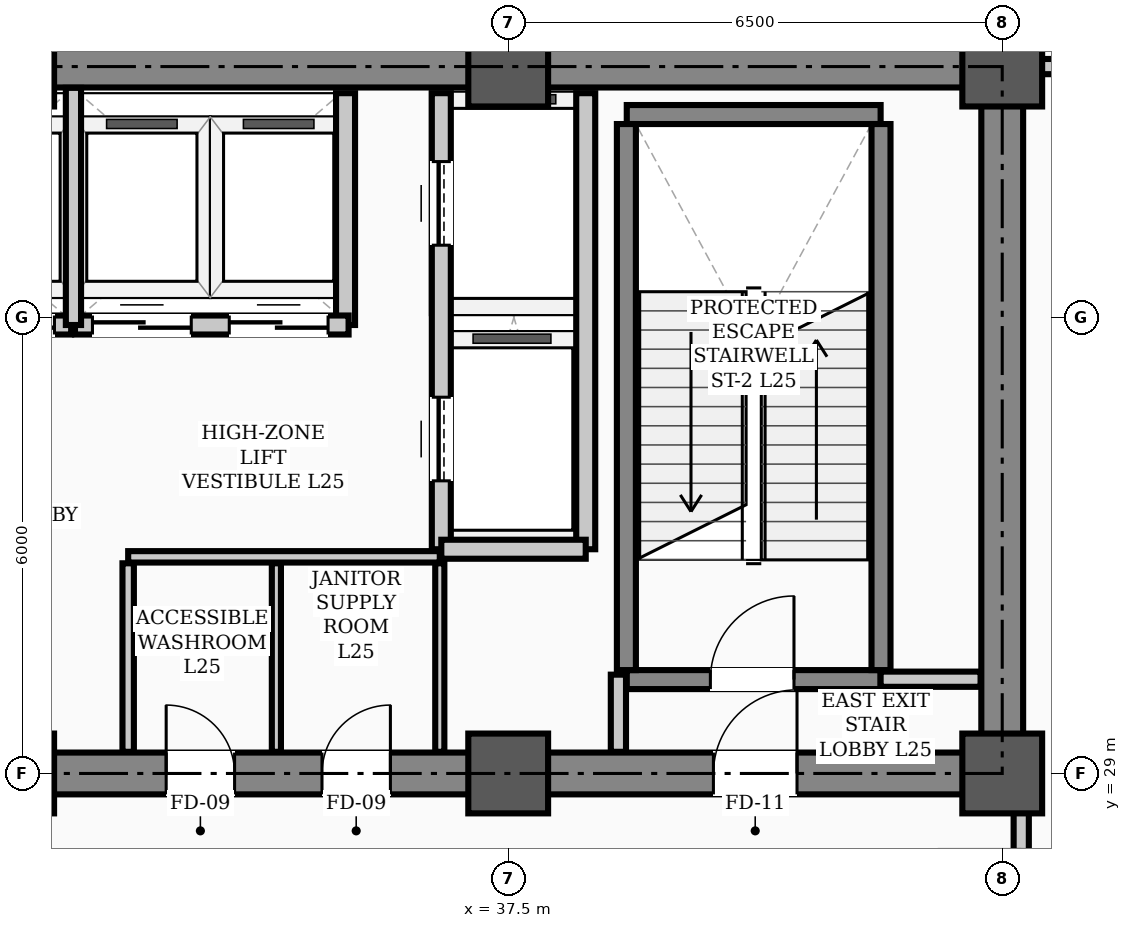
"""IFC4 building model, lengths in metres.
Left out: names, types, materials, properties, quantities, classifications, styles, units other than length and angle.
Written with IfcOpenShell. Run it as: python <this file> out.ifc"""

import sys

from ifc_helpers import new_model, si_unit, direction, frame, frame_2d, origin, origin_2d, place, context, subcontext, project, spatial, rectangle, hollow_rectangle, extrude, element, fill, save


model = new_model("IFC4")
c1 = context("Model", 3, precision=1e-05, world=origin(), true_north=direction((0.0, 1.0)))
c2 = subcontext(c1, "Body", "Model", "MODEL_VIEW")
j1 = project(units=[si_unit("LENGTHUNIT", "METRE"), si_unit("PLANEANGLEUNIT", "RADIAN")], contexts=[c1])
p1 = place(None, origin())
s1 = spatial("IfcSite", under=j1, at=p1, CompositionType="ELEMENT")
p2 = place(p1, origin())
s2 = spatial("IfcBuilding", under=s1, at=p2, CompositionType="ELEMENT")
p3 = place(p2, frame((0.0, 0.0, 100.6)))
s3 = spatial("IfcBuildingStorey", under=s2, at=p3, CompositionType="ELEMENT", Elevation=100.6)
for number, where, z_axis, x_axis in (
    (1, (31.0, 29.0, 0.0), (0.0, 0.0, 1.0), (1.0, 0.0, 0.0)),
    (2, (31.0, 38.3, 0.0), (0.0, 0.0, 1.0), (1.0, 0.0, 0.0)),
    (3, (37.5, 29.0, 0.0), (0.0, 0.0, 1.0), (1.0, 0.0, 0.0)),
    (4, (37.5, 38.3, 0.0), (0.0, 0.0, 1.0), (1.0, 0.0, 0.0)),
    (5, (44.0, 29.0, 0.0), (0.0, 0.0, 1.0), (1.0, 0.0, 0.0)),
    (6, (44.0, 38.3, 0.0), (0.0, 0.0, 1.0), (1.0, 0.0, 0.0)),
):
    element("IfcColumn", number, at=place(p3, frame(where, z_axis=z_axis, x_axis=x_axis)), inside=s3, PredefinedType="COLUMN", context=c2, shape_type="SweptSolid", body=[
        extrude(hollow_rectangle(XDim=1.05, YDim=1.05, WallThickness=0.038, InnerFilletRadius=0.019, OuterFilletRadius=0.057, at=origin_2d()), origin(), (0.0, 0.0, 1.0), 5.4),
    ])
p4 = place(p3, frame((13.5, 29.0, 0.0), z_axis=(0.0, 0.0, 1.0), x_axis=(1.0, 0.0, 0.0)))
e7 = element("IfcWall", 7, at=p4, inside=s3, PredefinedType="SHEAR", context=c2, shape_type="SweptSolid", body=[
    extrude(rectangle(XDim=30.5, YDim=0.55, at=frame_2d((15.25, 0.0))), origin(), (0.0, 0.0, 1.0), 5.22),
])
p5 = place(p4, frame((1.75, 0.0, 0.0)))
e8 = element("IfcOpeningElement", 8, at=p5, cuts=e7, PredefinedType="OPENING", context=c2, shape_type="SweptSolid", body=[
    extrude(rectangle(XDim=1.1, YDim=2.08, at=frame_2d((0.55, 1.04))), frame((0.0, 0.285, 0.0), z_axis=(0.0, -1.0, 0.0), x_axis=(1.0, 0.0, 0.0)), (0.0, 0.0, 1.0), 0.57),
])
p6 = place(p4, frame((26.7, 0.0, 0.0)))
e9 = element("IfcOpeningElement", 9, at=p6, cuts=e7, PredefinedType="OPENING", context=c2, shape_type="SweptSolid", body=[
    extrude(rectangle(XDim=1.1, YDim=2.08, at=frame_2d((0.55, 1.04))), frame((0.0, 0.285, 0.0), z_axis=(0.0, -1.0, 0.0), x_axis=(1.0, 0.0, 0.0)), (0.0, 0.0, 1.0), 0.57),
])
p7 = place(p4, frame((6.8, 0.0, 0.0)))
e10 = element("IfcOpeningElement", 10, at=p7, cuts=e7, PredefinedType="OPENING", context=c2, shape_type="SweptSolid", body=[
    extrude(rectangle(XDim=1.1, YDim=2.08, at=frame_2d((0.55, 1.04))), frame((0.0, 0.285, 0.0), z_axis=(0.0, -1.0, 0.0), x_axis=(1.0, 0.0, 0.0)), (0.0, 0.0, 1.0), 0.57),
])
p8 = place(p4, frame((13.2, 0.0, 0.0)))
e11 = element("IfcOpeningElement", 11, at=p8, cuts=e7, PredefinedType="OPENING", context=c2, shape_type="SweptSolid", body=[
    extrude(rectangle(XDim=1.6, YDim=2.08, at=frame_2d((0.8, 1.04))), frame((0.0, 0.285, 0.0), z_axis=(0.0, -1.0, 0.0), x_axis=(1.0, 0.0, 0.0)), (0.0, 0.0, 1.0), 0.57),
])
p9 = place(p4, frame((19.5, 0.0, 0.0)))
e12 = element("IfcOpeningElement", 12, at=p9, cuts=e7, PredefinedType="OPENING", context=c2, shape_type="SweptSolid", body=[
    extrude(rectangle(XDim=0.9, YDim=2.08, at=frame_2d((0.45, 1.04))), frame((0.0, 0.285, 0.0), z_axis=(0.0, -1.0, 0.0), x_axis=(1.0, 0.0, 0.0)), (0.0, 0.0, 1.0), 0.57),
])
p10 = place(p4, frame((21.55, 0.0, 0.0)))
e13 = element("IfcOpeningElement", 13, at=p10, cuts=e7, PredefinedType="OPENING", context=c2, shape_type="SweptSolid", body=[
    extrude(rectangle(XDim=0.9, YDim=2.08, at=frame_2d((0.45, 1.04))), frame((0.0, 0.285, 0.0), z_axis=(0.0, -1.0, 0.0), x_axis=(1.0, 0.0, 0.0)), (0.0, 0.0, 1.0), 0.57),
])
p11 = place(p3, frame((13.5, 38.3, 0.0), z_axis=(0.0, 0.0, 1.0), x_axis=(1.0, 0.0, 0.0)))
e14 = element("IfcWall", 14, at=p11, inside=s3, PredefinedType="SHEAR", context=c2, shape_type="SweptSolid", body=[
    extrude(rectangle(XDim=30.5, YDim=0.55, at=frame_2d((15.25, 0.0))), origin(), (0.0, 0.0, 1.0), 5.22),
])
p12 = place(p3, frame((44.0, 29.35, 0.0), z_axis=(0.0, 0.0, 1.0), x_axis=(0.0, 1.0, 0.0)))
e15 = element("IfcWall", 15, at=p12, inside=s3, PredefinedType="SHEAR", context=c2, shape_type="SweptSolid", body=[
    extrude(rectangle(XDim=8.6, YDim=0.55, at=frame_2d((4.3, 0.0))), origin(), (0.0, 0.0, 1.0), 5.22),
])
p13 = place(p3, frame((39.06, 30.235, 0.0), z_axis=(0.0, 0.0, 1.0), x_axis=(1.0, 0.0, 0.0)))
e16 = element("IfcWall", 16, at=p13, inside=s3, PredefinedType="STANDARD", context=c2, shape_type="SweptSolid", body=[
    extrude(rectangle(XDim=3.34, YDim=0.25, at=frame_2d((1.67, 0.0))), origin(), (0.0, 0.0, 1.0), 5.22),
])
p14 = place(p13, frame((1.1, 0.0, 0.0)))
e17 = element("IfcOpeningElement", 17, at=p14, cuts=e16, PredefinedType="OPENING", context=c2, shape_type="SweptSolid", body=[
    extrude(rectangle(XDim=1.1, YDim=2.08, at=frame_2d((0.55, 1.04))), frame((0.0, 0.135, 0.0), z_axis=(0.0, -1.0, 0.0), x_axis=(1.0, 0.0, 0.0)), (0.0, 0.0, 1.0), 0.27),
])
p15 = place(p3, frame((39.06, 37.669, 0.0), z_axis=(0.0, 0.0, 1.0), x_axis=(1.0, 0.0, 0.0)))
e18 = element("IfcWall", 18, at=p15, inside=s3, PredefinedType="STANDARD", context=c2, shape_type="SweptSolid", body=[
    extrude(rectangle(XDim=3.34, YDim=0.25, at=frame_2d((1.67, 0.0))), origin(), (0.0, 0.0, 1.0), 5.22),
])
for number, where, z_axis, x_axis in (
    (19, (39.055, 30.36, 0.0), (0.0, 0.0, 1.0), (0.0, 1.0, 0.0)),
    (20, (42.405, 30.36, 0.0), (0.0, 0.0, 1.0), (0.0, 1.0, 0.0)),
):
    element("IfcWall", number, at=place(p3, frame(where, z_axis=z_axis, x_axis=x_axis)), inside=s3, PredefinedType="STANDARD", context=c2, shape_type="SweptSolid", body=[
        extrude(rectangle(XDim=7.184, YDim=0.25, at=frame_2d((3.592, 0.0))), origin(), (0.0, 0.0, 1.0), 5.22),
    ])
p16 = place(p3, frame((36.62, 31.95, 0.0), z_axis=(0.0, 0.0, 1.0), x_axis=(0.0, 1.0, 0.0)))
e21 = element("IfcWall", 21, at=p16, inside=s3, PredefinedType="STANDARD", context=c2, shape_type="SweptSolid", body=[
    extrude(rectangle(XDim=6.0, YDim=0.25, at=frame_2d((3.0, 0.0))), origin(), (0.0, 0.0, 1.0), 4.8),
])
p17 = place(p16, frame((0.9, 0.0, 0.0)))
e22 = element("IfcOpeningElement", 22, at=p17, cuts=e21, PredefinedType="OPENING", context=c2, shape_type="SweptSolid", body=[
    extrude(rectangle(XDim=1.1, YDim=2.08, at=frame_2d((0.55, 1.04))), frame((0.0, 0.135, 0.0), z_axis=(0.0, -1.0, 0.0), x_axis=(1.0, 0.0, 0.0)), (0.0, 0.0, 1.0), 0.27),
])
p18 = place(p16, frame((4.0, 0.0, 0.0)))
e23 = element("IfcOpeningElement", 23, at=p18, cuts=e21, PredefinedType="OPENING", context=c2, shape_type="SweptSolid", body=[
    extrude(rectangle(XDim=1.1, YDim=2.08, at=frame_2d((0.55, 1.04))), frame((0.0, 0.135, 0.0), z_axis=(0.0, -1.0, 0.0), x_axis=(1.0, 0.0, 0.0)), (0.0, 0.0, 1.0), 0.27),
])
p19 = place(p3, frame((38.52, 31.95, 0.0), z_axis=(0.0, 0.0, 1.0), x_axis=(0.0, 1.0, 0.0)))
e24 = element("IfcWall", 24, at=p19, inside=s3, PredefinedType="STANDARD", context=c2, shape_type="SweptSolid", body=[
    extrude(rectangle(XDim=6.0, YDim=0.25, at=frame_2d((3.0, 0.0))), origin(), (0.0, 0.0, 1.0), 4.8),
])
p20 = place(p3, frame((36.62, 31.95, 0.0), z_axis=(0.0, 0.0, 1.0), x_axis=(1.0, 0.0, 0.0)))
e25 = element("IfcWall", 25, at=p20, inside=s3, PredefinedType="STANDARD", context=c2, shape_type="SweptSolid", body=[
    extrude(rectangle(XDim=1.9, YDim=0.25, at=frame_2d((0.95, 0.0))), origin(), (0.0, 0.0, 1.0), 4.98),
])
p21 = place(p3, frame((35.36, 34.9, 0.0), z_axis=(0.0, 0.0, 1.0), x_axis=(0.0, 1.0, 0.0)))
e26 = element("IfcWall", 26, at=p21, inside=s3, PredefinedType="STANDARD", context=c2, shape_type="SweptSolid", body=[
    extrude(rectangle(XDim=3.05, YDim=0.25, at=frame_2d((1.525, 0.0))), origin(), (0.0, 0.0, 1.0), 4.8),
])
p22 = place(p3, frame((28.2, 34.9, 0.0), z_axis=(0.0, 0.0, 1.0), x_axis=(1.0, 0.0, 0.0)))
e27 = element("IfcWall", 27, at=p22, inside=s3, PredefinedType="STANDARD", context=c2, shape_type="SweptSolid", body=[
    extrude(rectangle(XDim=3.55, YDim=0.25, at=frame_2d((1.775, 0.0))), origin(), (0.0, 0.0, 1.0), 5.22),
])
p23 = place(p22, frame((0.23, 0.0, 0.0)))
e28 = element("IfcOpeningElement", 28, at=p23, cuts=e27, PredefinedType="OPENING", context=c2, shape_type="SweptSolid", body=[
    extrude(rectangle(XDim=1.3, YDim=2.08, at=frame_2d((0.65, 1.04))), frame((0.0, 0.135, 0.0), z_axis=(0.0, -1.0, 0.0), x_axis=(1.0, 0.0, 0.0)), (0.0, 0.0, 1.0), 0.27),
])
p24 = place(p22, frame((2.03, 0.0, 0.0)))
e29 = element("IfcOpeningElement", 29, at=p24, cuts=e27, PredefinedType="OPENING", context=c2, shape_type="SweptSolid", body=[
    extrude(rectangle(XDim=1.3, YDim=2.08, at=frame_2d((0.65, 1.04))), frame((0.0, 0.135, 0.0), z_axis=(0.0, -1.0, 0.0), x_axis=(1.0, 0.0, 0.0)), (0.0, 0.0, 1.0), 0.27),
])
p25 = place(p3, frame((31.8, 34.9, 0.0), z_axis=(0.0, 0.0, 1.0), x_axis=(1.0, 0.0, 0.0)))
e30 = element("IfcWall", 30, at=p25, inside=s3, PredefinedType="STANDARD", context=c2, shape_type="SweptSolid", body=[
    extrude(rectangle(XDim=3.6, YDim=0.25, at=frame_2d((1.8, 0.0))), origin(), (0.0, 0.0, 1.0), 5.22),
])
p26 = place(p25, frame((0.23, 0.0, 0.0)))
e31 = element("IfcOpeningElement", 31, at=p26, cuts=e30, PredefinedType="OPENING", context=c2, shape_type="SweptSolid", body=[
    extrude(rectangle(XDim=1.3, YDim=2.08, at=frame_2d((0.65, 1.04))), frame((0.0, 0.135, 0.0), z_axis=(0.0, -1.0, 0.0), x_axis=(1.0, 0.0, 0.0)), (0.0, 0.0, 1.0), 0.27),
])
p27 = place(p25, frame((2.03, 0.0, 0.0)))
e32 = element("IfcOpeningElement", 32, at=p27, cuts=e30, PredefinedType="OPENING", context=c2, shape_type="SweptSolid", body=[
    extrude(rectangle(XDim=1.3, YDim=2.08, at=frame_2d((0.65, 1.04))), frame((0.0, 0.135, 0.0), z_axis=(0.0, -1.0, 0.0), x_axis=(1.0, 0.0, 0.0)), (0.0, 0.0, 1.0), 0.27),
])
p28 = place(p3, frame((42.4, 30.24, 0.0), z_axis=(0.0, 0.0, 1.0), x_axis=(1.0, 0.0, 0.0)))
e33 = element("IfcWall", 33, at=p28, inside=s3, PredefinedType="STANDARD", context=c2, shape_type="SweptSolid", body=[
    extrude(rectangle(XDim=1.315, YDim=0.2, at=frame_2d((0.658, 0.0))), origin(), (0.0, 0.0, 1.0), 4.6),
])
p29 = place(p3, frame((32.5, 31.85, 0.0), z_axis=(0.0, 0.0, 1.0), x_axis=(1.0, 0.0, 0.0)))
e34 = element("IfcWall", 34, at=p29, inside=s3, PredefinedType="PARTITIONING", context=c2, shape_type="SweptSolid", body=[
    extrude(rectangle(XDim=4.1, YDim=0.15, at=frame_2d((2.05, 0.0))), origin(), (0.0, 0.0, 1.0), 5.22),
])
p30 = place(p3, frame((44.0, 38.3, 0.0), z_axis=(0.0, 0.0, 1.0), x_axis=(1.0, 0.0, 0.0)))
e35 = element("IfcWall", 35, at=p30, inside=s3, PredefinedType="STANDARD", context=c2, shape_type="SweptSolid", body=[
    extrude(rectangle(XDim=13.19, YDim=0.2, at=frame_2d((6.595, 0.0))), origin(), (0.0, 0.0, 1.0), 4.5),
])
p31 = place(p3, frame((38.95, 29.285, 0.0), z_axis=(0.0, 0.0, 1.0), x_axis=(0.0, 1.0, 0.0)))
e36 = element("IfcWall", 36, at=p31, inside=s3, PredefinedType="STANDARD", context=c2, shape_type="SweptSolid", body=[
    extrude(rectangle(XDim=1.015, YDim=0.2, at=frame_2d((0.508, 0.0))), origin(), (0.0, 0.0, 1.0), 4.8),
])
p32 = place(p3, frame((32.5, 29.285, 0.0), z_axis=(0.0, 0.0, 1.0), x_axis=(0.0, 1.0, 0.0)))
e37 = element("IfcWall", 37, at=p32, inside=s3, PredefinedType="PARTITIONING", context=c2, shape_type="SweptSolid", body=[
    extrude(rectangle(XDim=2.48, YDim=0.15, at=frame_2d((1.24, 0.0))), origin(), (0.0, 0.0, 1.0), 4.8),
])
for number, where, z_axis, x_axis in (
    (38, (36.6, 29.285, 0.0), (0.0, 0.0, 1.0), (0.0, 1.0, 0.0)),
    (39, (34.45, 29.285, 0.0), (0.0, 0.0, 1.0), (0.0, 1.0, 0.0)),
):
    element("IfcWall", number, at=place(p3, frame(where, z_axis=z_axis, x_axis=x_axis)), inside=s3, PredefinedType="PARTITIONING", context=c2, shape_type="SweptSolid", body=[
        extrude(rectangle(XDim=2.48, YDim=0.12, at=frame_2d((1.24, 0.0))), origin(), (0.0, 0.0, 1.0), 4.8),
    ])
p33 = place(p3, frame((44.25, 26.11, 0.0), z_axis=(0.0, 0.0, 1.0), x_axis=(0.0, 1.0, 0.0)))
e40 = element("IfcWall", 40, at=p33, inside=s3, PredefinedType="STANDARD", context=c2, shape_type="SweptSolid", body=[
    extrude(rectangle(XDim=3.24, YDim=0.2, at=frame_2d((1.62, 0.0))), origin(), (0.0, 0.0, 1.0), 4.5),
])
p34 = place(p33, frame((0.79, 0.0, 0.0)))
e41 = element("IfcOpeningElement", 41, at=p34, cuts=e40, PredefinedType="OPENING", context=c2, shape_type="SweptSolid", body=[
    extrude(rectangle(XDim=1.1, YDim=2.08, at=frame_2d((0.55, 1.04))), frame((0.0, 0.11, 0.0), z_axis=(0.0, -1.0, 0.0), x_axis=(1.0, 0.0, 0.0)), (0.0, 0.0, 1.0), 0.22),
])
p35 = place(p3, frame((31.78, 34.9, 0.0), z_axis=(0.0, 0.0, 1.0), x_axis=(0.0, 1.0, 0.0)))
e42 = element("IfcWall", 42, at=p35, inside=s3, PredefinedType="STANDARD", context=c2, shape_type="SweptSolid", body=[
    extrude(rectangle(XDim=3.12, YDim=0.2, at=frame_2d((1.56, 0.0))), origin(), (0.0, 0.0, 1.0), 4.8),
])
p36 = place(p14, origin())
e43 = element("IfcDoor", 43, at=p36, inside=s3, OperationType="SINGLE_SWING_RIGHT", PredefinedType="DOOR", context=c2, shape_type="SweptSolid", body=[
    extrude(rectangle(XDim=1.1, YDim=2.08, at=frame_2d((0.55, 1.04))), frame((0.0, 0.025, 0.0), z_axis=(0.0, -1.0, 0.0), x_axis=(1.0, 0.0, 0.0)), (0.0, 0.0, 1.0), 0.05),
])
fill(e17, e43)
p37 = place(p6, origin())
e44 = element("IfcDoor", 44, at=p37, inside=s3, OperationType="SINGLE_SWING_RIGHT", PredefinedType="DOOR", context=c2, shape_type="SweptSolid", body=[
    extrude(rectangle(XDim=1.1, YDim=2.08, at=frame_2d((0.55, 1.04))), frame((0.0, 0.025, 0.0), z_axis=(0.0, -1.0, 0.0), x_axis=(1.0, 0.0, 0.0)), (0.0, 0.0, 1.0), 0.05),
])
fill(e9, e44)
p38 = place(p9, origin())
e45 = element("IfcDoor", 45, at=p38, inside=s3, OperationType="SINGLE_SWING_LEFT", PredefinedType="DOOR", context=c2, shape_type="SweptSolid", body=[
    extrude(rectangle(XDim=0.9, YDim=2.08, at=frame_2d((0.45, 1.04))), frame((0.0, 0.025, 0.0), z_axis=(0.0, -1.0, 0.0), x_axis=(1.0, 0.0, 0.0)), (0.0, 0.0, 1.0), 0.05),
])
fill(e12, e45)
p39 = place(p10, origin())
e46 = element("IfcDoor", 46, at=p39, inside=s3, OperationType="SINGLE_SWING_RIGHT", PredefinedType="DOOR", context=c2, shape_type="SweptSolid", body=[
    extrude(rectangle(XDim=0.9, YDim=2.08, at=frame_2d((0.45, 1.04))), frame((0.0, 0.025, 0.0), z_axis=(0.0, -1.0, 0.0), x_axis=(1.0, 0.0, 0.0)), (0.0, 0.0, 1.0), 0.05),
])
fill(e13, e46)
p40 = place(p17, origin())
e47 = element("IfcDoor", 47, at=p40, inside=s3, OperationType="SLIDING_TO_LEFT", PredefinedType="DOOR", context=c2, shape_type="SweptSolid", body=[
    extrude(rectangle(XDim=1.1, YDim=2.08, at=frame_2d((0.55, 1.04))), frame((0.0, 0.025, 0.0), z_axis=(0.0, -1.0, 0.0), x_axis=(1.0, 0.0, 0.0)), (0.0, 0.0, 1.0), 0.05),
])
fill(e22, e47)
p41 = place(p18, origin())
e48 = element("IfcDoor", 48, at=p41, inside=s3, OperationType="SLIDING_TO_LEFT", PredefinedType="DOOR", context=c2, shape_type="SweptSolid", body=[
    extrude(rectangle(XDim=1.1, YDim=2.08, at=frame_2d((0.55, 1.04))), frame((0.0, 0.025, 0.0), z_axis=(0.0, -1.0, 0.0), x_axis=(1.0, 0.0, 0.0)), (0.0, 0.0, 1.0), 0.05),
])
fill(e23, e48)
p42 = place(p24, origin())
e49 = element("IfcDoor", 49, at=p42, inside=s3, OperationType="DOUBLE_DOOR_SLIDING", PredefinedType="DOOR", context=c2, shape_type="SweptSolid", body=[
    extrude(rectangle(XDim=1.3, YDim=2.08, at=frame_2d((0.65, 1.04))), frame((0.0, 0.025, 0.0), z_axis=(0.0, -1.0, 0.0), x_axis=(1.0, 0.0, 0.0)), (0.0, 0.0, 1.0), 0.05),
])
fill(e29, e49)
p43 = place(p26, origin())
e50 = element("IfcDoor", 50, at=p43, inside=s3, OperationType="DOUBLE_DOOR_SLIDING", PredefinedType="DOOR", context=c2, shape_type="SweptSolid", body=[
    extrude(rectangle(XDim=1.3, YDim=2.08, at=frame_2d((0.65, 1.04))), frame((0.0, 0.025, 0.0), z_axis=(0.0, -1.0, 0.0), x_axis=(1.0, 0.0, 0.0)), (0.0, 0.0, 1.0), 0.05),
])
fill(e31, e50)
p44 = place(p27, origin())
e51 = element("IfcDoor", 51, at=p44, inside=s3, OperationType="DOUBLE_DOOR_SLIDING", PredefinedType="DOOR", context=c2, shape_type="SweptSolid", body=[
    extrude(rectangle(XDim=1.3, YDim=2.08, at=frame_2d((0.65, 1.04))), frame((0.0, 0.025, 0.0), z_axis=(0.0, -1.0, 0.0), x_axis=(1.0, 0.0, 0.0)), (0.0, 0.0, 1.0), 0.05),
])
fill(e32, e51)
save(model, sys.argv[1])
